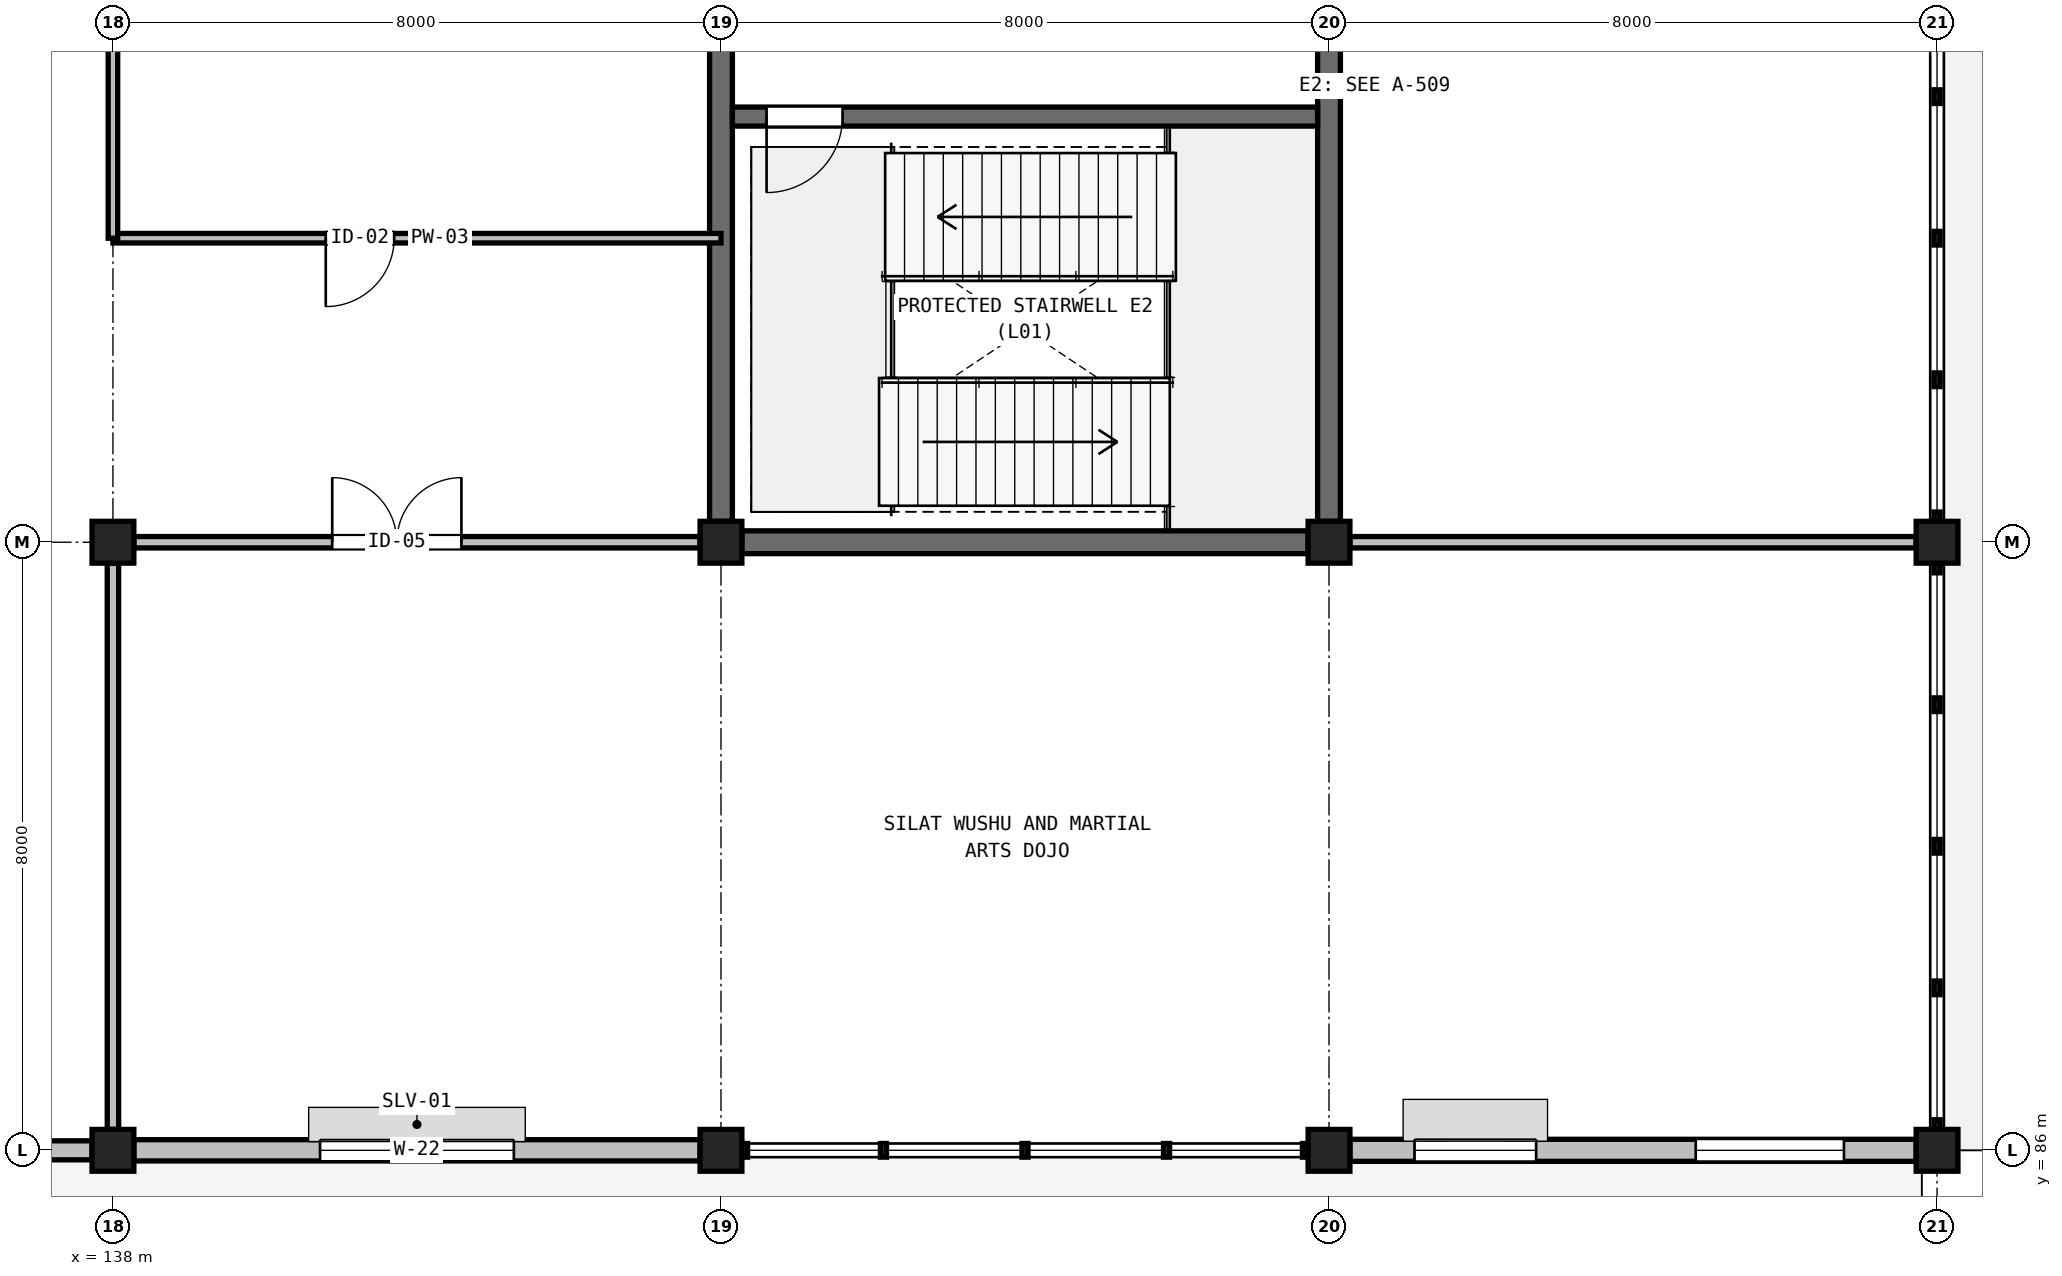
"""IFC4 building model, lengths in metres.
Left out: names, types, materials, properties, quantities, classifications, styles, units other than length and angle.
Written with IfcOpenShell. Run it as: python <this file> out.ifc"""

import sys

from ifc_helpers import new_model, si_unit, direction, frame, frame_2d, origin, origin_2d, place, context, subcontext, project, spatial, rectangle, circle, extrude, element, fill, save


model = new_model("IFC4")
c1 = context("Model", 3, precision=1e-05, world=origin(), true_north=direction((0.0, 1.0)))
c2 = subcontext(c1, "Body", "Model", "MODEL_VIEW")
j1 = project(units=[si_unit("LENGTHUNIT", "METRE"), si_unit("PLANEANGLEUNIT", "RADIAN")], contexts=[c1])
p1 = place(None, origin())
s1 = spatial("IfcSite", under=j1, at=p1, CompositionType="ELEMENT")
p2 = place(p1, origin())
s2 = spatial("IfcBuilding", under=s1, at=p2, CompositionType="ELEMENT")
p3 = place(p2, frame((0.0, 0.0, 5.4)))
s3 = spatial("IfcBuildingStorey", under=s2, at=p3, CompositionType="ELEMENT", Elevation=5.4)
for number, where, z_axis, x_axis in (
    (1, (138.0, 86.0, 0.0), (0.0, 0.0, 1.0), (1.0, 0.0, 0.0)),
    (2, (138.0, 94.0, 0.0), (0.0, 0.0, 1.0), (1.0, 0.0, 0.0)),
    (3, (146.0, 86.0, 0.0), (0.0, 0.0, 1.0), (1.0, 0.0, 0.0)),
    (4, (146.0, 94.0, 0.0), (0.0, 0.0, 1.0), (1.0, 0.0, 0.0)),
    (5, (154.0, 86.0, 0.0), (0.0, 0.0, 1.0), (1.0, 0.0, 0.0)),
    (6, (154.0, 94.0, 0.0), (0.0, 0.0, 1.0), (1.0, 0.0, 0.0)),
    (7, (162.0, 86.0, 0.0), (0.0, 0.0, 1.0), (1.0, 0.0, 0.0)),
    (8, (162.0, 94.0, 0.0), (0.0, 0.0, 1.0), (1.0, 0.0, 0.0)),
):
    element("IfcColumn", number, at=place(p3, frame(where, z_axis=z_axis, x_axis=x_axis)), inside=s3, PredefinedType="COLUMN", context=c2, shape_type="SweptSolid", body=[
        extrude(circle(Radius=0.275, at=origin_2d()), origin(), (0.0, 0.0, 1.0), 5.4),
    ])
p4 = place(p3, frame((130.275, 86.0, 0.0), z_axis=(0.0, 0.0, 1.0), x_axis=(1.0, 0.0, 0.0)))
e9 = element("IfcWall", 9, at=p4, inside=s3, PredefinedType="SOLIDWALL", context=c2, shape_type="SweptSolid", body=[
    extrude(rectangle(XDim=7.45, YDim=0.25, at=frame_2d((3.725, 0.0))), origin(), (0.0, 0.0, 1.0), 4.59),
])
p5 = place(p4, frame((0.85, 0.0, 0.9)))
e10 = element("IfcOpeningElement", 10, at=p5, cuts=e9, PredefinedType="OPENING", context=c2, shape_type="SweptSolid", body=[
    extrude(rectangle(XDim=1.6, YDim=2.0, at=frame_2d((0.8, 1.0))), frame((0.0, 0.135, 0.0), z_axis=(0.0, -1.0, 0.0), x_axis=(1.0, 0.0, 0.0)), (0.0, 0.0, 1.0), 0.27),
])
p6 = place(p4, frame((4.55, 0.0, 0.95)))
e11 = element("IfcOpeningElement", 11, at=p6, cuts=e9, PredefinedType="OPENING", context=c2, shape_type="SweptSolid", body=[
    extrude(rectangle(XDim=1.95, YDim=1.85, at=frame_2d((0.975, 0.925))), frame((0.0, 0.135, 0.0), z_axis=(0.0, -1.0, 0.0), x_axis=(1.0, 0.0, 0.0)), (0.0, 0.0, 1.0), 0.27),
])
p7 = place(p3, frame((138.275, 86.0, 0.0), z_axis=(0.0, 0.0, 1.0), x_axis=(1.0, 0.0, 0.0)))
e12 = element("IfcWall", 12, at=p7, inside=s3, PredefinedType="SOLIDWALL", context=c2, shape_type="SweptSolid", body=[
    extrude(rectangle(XDim=7.45, YDim=0.28, at=frame_2d((3.725, 0.0))), origin(), (0.0, 0.0, 1.0), 4.49),
])
p8 = place(p7, frame((2.45, 0.0, 0.95)))
e13 = element("IfcOpeningElement", 13, at=p8, cuts=e12, PredefinedType="OPENING", context=c2, shape_type="SweptSolid", body=[
    extrude(rectangle(XDim=2.55, YDim=1.85, at=frame_2d((1.275, 0.925))), frame((0.0, 0.15, 0.0), z_axis=(0.0, -1.0, 0.0), x_axis=(1.0, 0.0, 0.0)), (0.0, 0.0, 1.0), 0.3),
])
p9 = place(p3, frame((154.275, 86.0, 0.0), z_axis=(0.0, 0.0, 1.0), x_axis=(1.0, 0.0, 0.0)))
e14 = element("IfcWall", 14, at=p9, inside=s3, PredefinedType="SOLIDWALL", context=c2, shape_type="SweptSolid", body=[
    extrude(rectangle(XDim=7.45, YDim=0.29, at=frame_2d((3.725, 0.0))), origin(), (0.0, 0.0, 1.0), 4.29),
])
p10 = place(p9, frame((0.85, 0.0, 0.9)))
e15 = element("IfcOpeningElement", 15, at=p10, cuts=e14, PredefinedType="OPENING", context=c2, shape_type="SweptSolid", body=[
    extrude(rectangle(XDim=1.6, YDim=2.0, at=frame_2d((0.8, 1.0))), frame((0.0, 0.155, 0.0), z_axis=(0.0, -1.0, 0.0), x_axis=(1.0, 0.0, 0.0)), (0.0, 0.0, 1.0), 0.31),
])
p11 = place(p9, frame((4.55, 0.0, 0.95)))
e16 = element("IfcOpeningElement", 16, at=p11, cuts=e14, PredefinedType="OPENING", context=c2, shape_type="SweptSolid", body=[
    extrude(rectangle(XDim=1.95, YDim=1.85, at=frame_2d((0.975, 0.925))), frame((0.0, 0.155, 0.0), z_axis=(0.0, -1.0, 0.0), x_axis=(1.0, 0.0, 0.0)), (0.0, 0.0, 1.0), 0.31),
])
for number, where, z_axis, x_axis in (
    (17, (146.275, 94.0, 0.0), (0.0, 0.0, 1.0), (1.0, 0.0, 0.0)),
    (18, (146.0, 94.275, 0.0), (0.0, 0.0, 1.0), (0.0, 1.0, 0.0)),
    (19, (154.0, 94.275, 0.0), (0.0, 0.0, 1.0), (0.0, 1.0, 0.0)),
):
    element("IfcWall", number, at=place(p3, frame(where, z_axis=z_axis, x_axis=x_axis)), inside=s3, PredefinedType="SHEAR", context=c2, shape_type="SweptSolid", body=[
        extrude(rectangle(XDim=7.45, YDim=0.3, at=frame_2d((3.725, 0.0))), origin(), (0.0, 0.0, 1.0), 5.18),
    ])
p12 = place(p3, frame((146.15, 99.6, 0.0), z_axis=(0.0, 0.0, 1.0), x_axis=(1.0, 0.0, 0.0)))
e20 = element("IfcWall", 20, at=p12, inside=s3, PredefinedType="SOLIDWALL", context=c2, shape_type="SweptSolid", body=[
    extrude(rectangle(XDim=7.7, YDim=0.25, at=frame_2d((3.85, 0.0))), origin(), (0.0, 0.0, 1.0), 5.18),
])
p13 = place(p12, frame((0.45, 0.0, 0.0)))
e21 = element("IfcOpeningElement", 21, at=p13, cuts=e20, PredefinedType="OPENING", context=c2, shape_type="SweptSolid", body=[
    extrude(rectangle(XDim=1.0, YDim=2.2, at=frame_2d((0.5, 1.1))), frame((0.0, 0.135, 0.0), z_axis=(0.0, -1.0, 0.0), x_axis=(1.0, 0.0, 0.0)), (0.0, 0.0, 1.0), 0.27),
])
p14 = place(p3, frame((138.275, 94.0, 0.0), z_axis=(0.0, 0.0, 1.0), x_axis=(1.0, 0.0, 0.0)))
e22 = element("IfcWall", 22, at=p14, inside=s3, PredefinedType="PARTITIONING", context=c2, shape_type="SweptSolid", body=[
    extrude(rectangle(XDim=7.45, YDim=0.15, at=frame_2d((3.725, 0.0))), origin(), (0.0, 0.0, 1.0), 4.34),
])
p15 = place(p14, frame((2.61, 0.0, 0.0)))
e23 = element("IfcOpeningElement", 23, at=p15, cuts=e22, PredefinedType="OPENING", context=c2, shape_type="SweptSolid", body=[
    extrude(rectangle(XDim=1.7, YDim=2.25, at=frame_2d((0.85, 1.125))), frame((0.0, 0.085, 0.0), z_axis=(0.0, -1.0, 0.0), x_axis=(1.0, 0.0, 0.0)), (0.0, 0.0, 1.0), 0.17),
])
p16 = place(p3, frame((154.275, 94.0, 0.0), z_axis=(0.0, 0.0, 1.0), x_axis=(1.0, 0.0, 0.0)))
e24 = element("IfcWall", 24, at=p16, inside=s3, PredefinedType="PARTITIONING", context=c2, shape_type="SweptSolid", body=[
    extrude(rectangle(XDim=7.45, YDim=0.15, at=frame_2d((3.725, 0.0))), origin(), (0.0, 0.0, 1.0), 4.42),
])
p17 = place(p3, frame((138.0, 86.275, 0.0), z_axis=(0.0, 0.0, 1.0), x_axis=(0.0, 1.0, 0.0)))
e25 = element("IfcWall", 25, at=p17, inside=s3, PredefinedType="PARTITIONING", context=c2, shape_type="SweptSolid", body=[
    extrude(rectangle(XDim=7.45, YDim=0.15, at=frame_2d((3.725, 0.0))), origin(), (0.0, 0.0, 1.0), 4.39),
])
p18 = place(p3, frame((138.0, 98.0, 0.0), z_axis=(0.0, 0.0, 1.0), x_axis=(1.0, 0.0, 0.0)))
e26 = element("IfcWall", 26, at=p18, inside=s3, PredefinedType="PARTITIONING", context=c2, shape_type="SweptSolid", body=[
    extrude(rectangle(XDim=8.0, YDim=0.125, at=frame_2d((4.0, 0.0))), origin(), (0.0, 0.0, 1.0), 5.1),
])
p19 = place(p18, frame((2.8, 0.0, 0.0)))
e27 = element("IfcOpeningElement", 27, at=p19, cuts=e26, PredefinedType="OPENING", context=c2, shape_type="SweptSolid", body=[
    extrude(rectangle(XDim=0.9, YDim=2.1, at=frame_2d((0.45, 1.05))), frame((0.0, 0.073, 0.0), z_axis=(0.0, -1.0, 0.0), x_axis=(1.0, 0.0, 0.0)), (0.0, 0.0, 1.0), 0.145),
])
p20 = place(p3, frame((138.0, 98.0, 0.0), z_axis=(0.0, 0.0, 1.0), x_axis=(0.0, 1.0, 0.0)))
e28 = element("IfcWall", 28, at=p20, inside=s3, PredefinedType="PARTITIONING", context=c2, shape_type="SweptSolid", body=[
    extrude(rectangle(XDim=6.0, YDim=0.125, at=frame_2d((3.0, 0.0))), origin(), (0.0, 0.0, 1.0), 4.34),
])
p21 = place(p8, origin())
e29 = element("IfcWindow", 29, at=p21, inside=s3, PartitioningType="SINGLE_PANEL", PredefinedType="WINDOW", context=c2, shape_type="SweptSolid", body=[
    extrude(rectangle(XDim=2.55, YDim=1.85, at=frame_2d((1.275, 0.925))), frame((0.0, 0.03, 0.0), z_axis=(0.0, -1.0, 0.0), x_axis=(1.0, 0.0, 0.0)), (0.0, 0.0, 1.0), 0.06),
])
fill(e13, e29)
p22 = place(p10, origin())
e30 = element("IfcWindow", 30, at=p22, inside=s3, PartitioningType="SINGLE_PANEL", PredefinedType="WINDOW", context=c2, shape_type="SweptSolid", body=[
    extrude(rectangle(XDim=1.6, YDim=2.0, at=frame_2d((0.8, 1.0))), frame((0.0, 0.03, 0.0), z_axis=(0.0, -1.0, 0.0), x_axis=(1.0, 0.0, 0.0)), (0.0, 0.0, 1.0), 0.06),
])
fill(e15, e30)
p23 = place(p11, origin())
e31 = element("IfcWindow", 31, at=p23, inside=s3, PartitioningType="SINGLE_PANEL", PredefinedType="WINDOW", context=c2, shape_type="SweptSolid", body=[
    extrude(rectangle(XDim=1.95, YDim=1.85, at=frame_2d((0.975, 0.925))), frame((0.0, 0.03, 0.0), z_axis=(0.0, -1.0, 0.0), x_axis=(1.0, 0.0, 0.0)), (0.0, 0.0, 1.0), 0.06),
])
fill(e16, e31)
p24 = place(p13, frame((1.0, 0.0, 0.0), z_axis=(0.0, 0.0, 1.0), x_axis=(-1.0, 0.0, 0.0)))
e32 = element("IfcDoor", 32, at=p24, inside=s3, OperationType="SINGLE_SWING_LEFT", PredefinedType="DOOR", context=c2, shape_type="SweptSolid", body=[
    extrude(rectangle(XDim=1.0, YDim=2.2, at=frame_2d((0.5, 1.1))), frame((0.0, 0.025, 0.0), z_axis=(0.0, -1.0, 0.0), x_axis=(1.0, 0.0, 0.0)), (0.0, 0.0, 1.0), 0.05),
])
fill(e21, e32)
p25 = place(p15, origin())
e33 = element("IfcDoor", 33, at=p25, inside=s3, OperationType="DOUBLE_DOOR_SINGLE_SWING", PredefinedType="DOOR", context=c2, shape_type="SweptSolid", body=[
    extrude(rectangle(XDim=1.7, YDim=2.25, at=frame_2d((0.85, 1.125))), frame((0.0, 0.025, 0.0), z_axis=(0.0, -1.0, 0.0), x_axis=(1.0, 0.0, 0.0)), (0.0, 0.0, 1.0), 0.05),
])
fill(e23, e33)
p26 = place(p19, frame((0.9, 0.0, 0.0), z_axis=(0.0, 0.0, 1.0), x_axis=(-1.0, 0.0, 0.0)))
e34 = element("IfcDoor", 34, at=p26, inside=s3, OperationType="SINGLE_SWING_LEFT", PredefinedType="DOOR", context=c2, shape_type="SweptSolid", body=[
    extrude(rectangle(XDim=0.9, YDim=2.1, at=frame_2d((0.45, 1.05))), frame((0.0, 0.025, 0.0), z_axis=(0.0, -1.0, 0.0), x_axis=(1.0, 0.0, 0.0)), (0.0, 0.0, 1.0), 0.05),
])
fill(e27, e34)
save(model, sys.argv[1])
